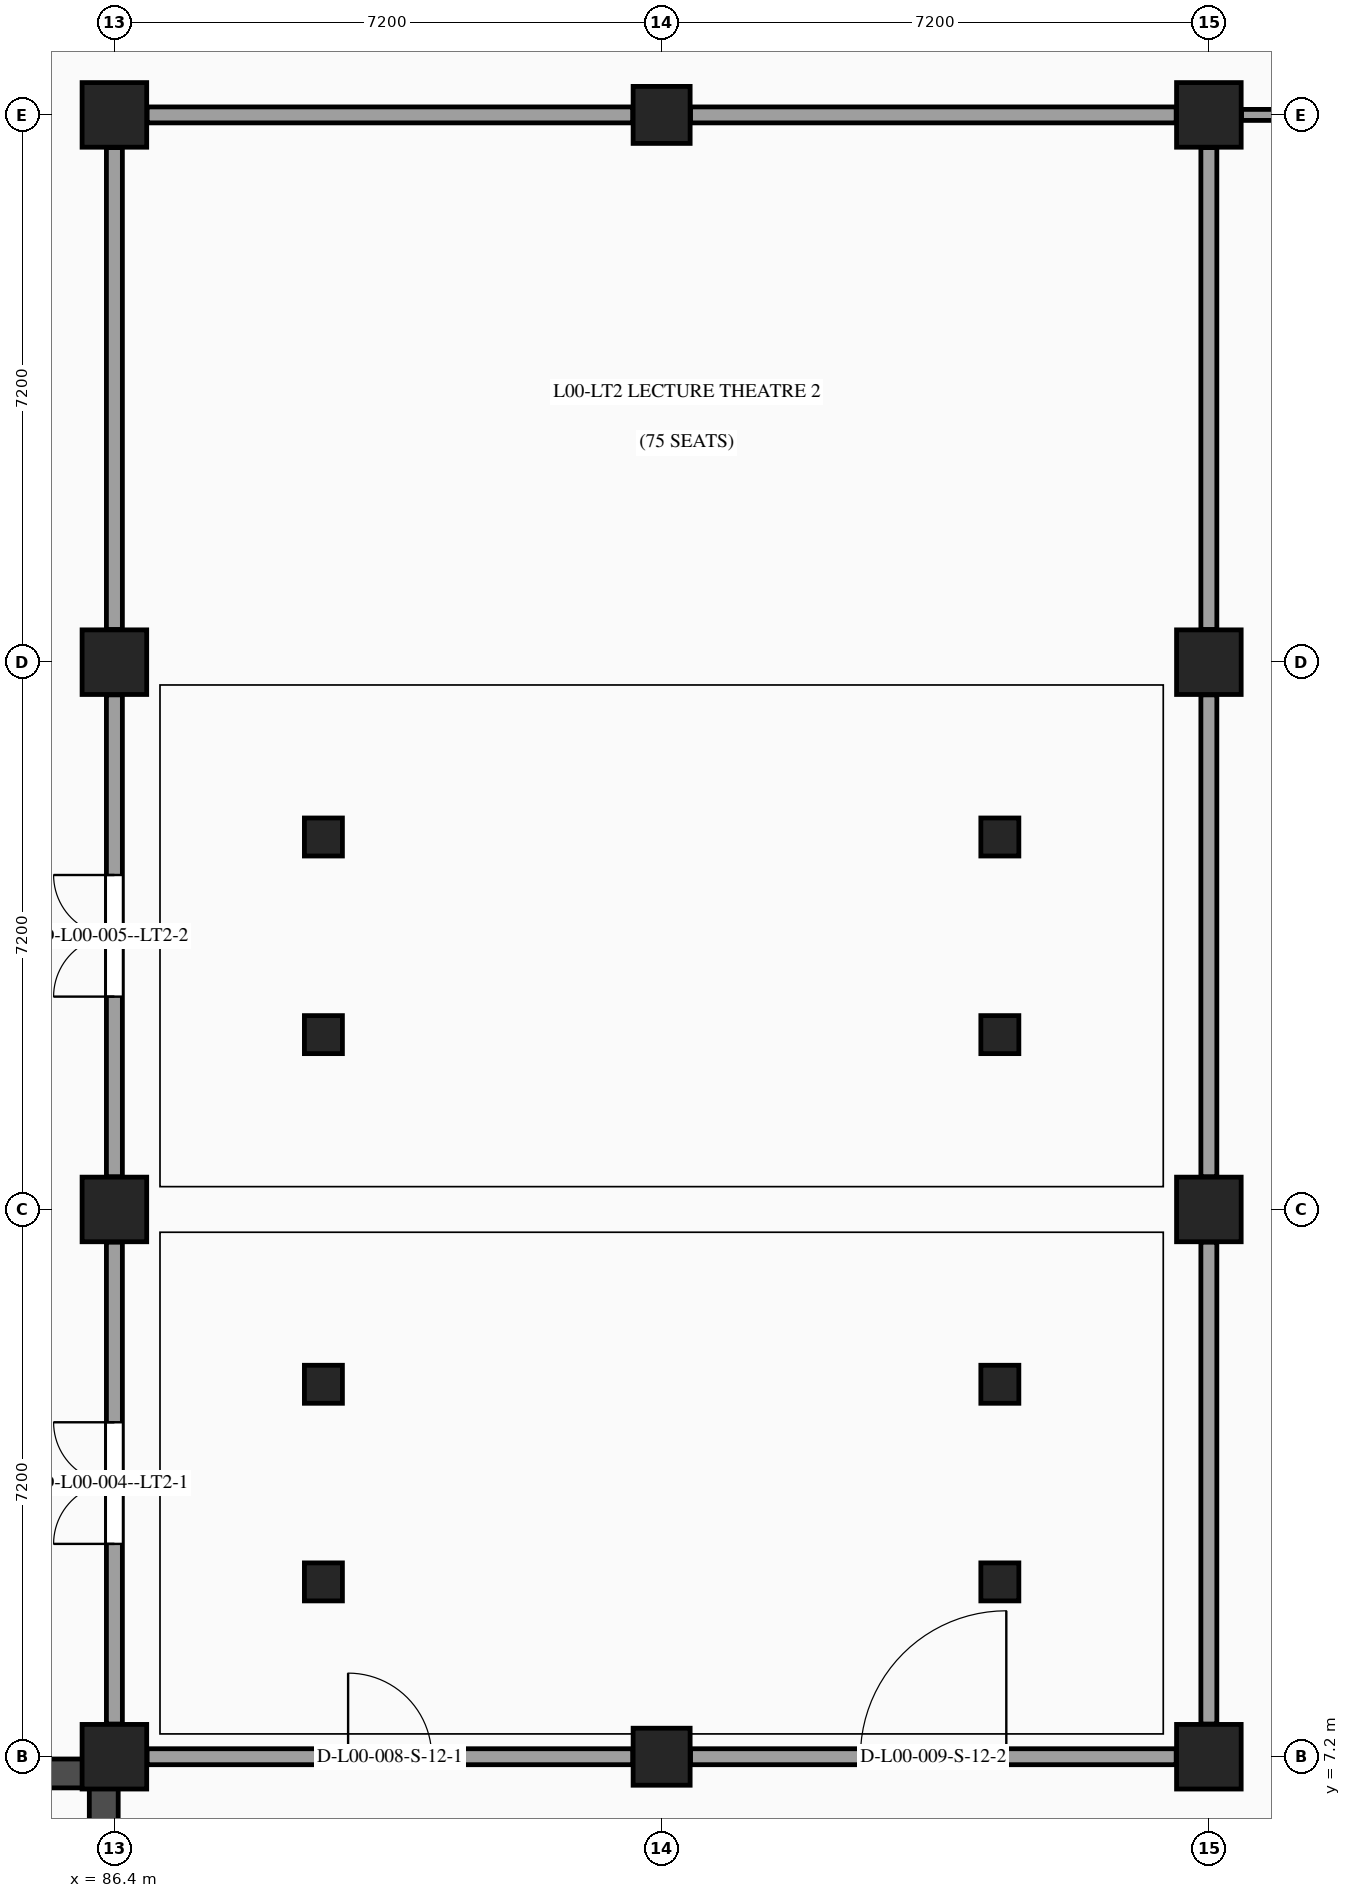
"""IFC4 building model, lengths in metres.
Left out: names, types, materials, properties, quantities, classifications, styles, units other than length and angle.
Written with IfcOpenShell. Run it as: python <this file> out.ifc"""

import sys

from ifc_helpers import new_model, si_unit, direction, frame, frame_2d, origin, origin_2d, place, context, subcontext, project, spatial, rectangle, extrude, element, fill, save


model = new_model("IFC4")
c1 = context("Model", 3, precision=1e-05, world=origin(), true_north=direction((0.0, 1.0)))
c2 = subcontext(c1, "Body", "Model", "MODEL_VIEW")
j1 = project(units=[si_unit("LENGTHUNIT", "METRE"), si_unit("PLANEANGLEUNIT", "RADIAN")], contexts=[c1])
p1 = place(None, origin())
s1 = spatial("IfcSite", under=j1, at=p1, CompositionType="ELEMENT")
p2 = place(p1, origin())
s2 = spatial("IfcBuilding", under=s1, at=p2, CompositionType="ELEMENT")
p3 = place(p2, origin())
s3 = spatial("IfcBuildingStorey", under=s2, at=p3, CompositionType="ELEMENT", Elevation=0.0)
for number, where, z_axis, x_axis in (
    (1, (86.4, 7.2, 0.0), (0.0, 0.0, 1.0), (1.0, 0.0, 0.0)),
    (2, (86.4, 14.4, 0.0), (0.0, 0.0, 1.0), (1.0, 0.0, 0.0)),
    (3, (86.4, 21.6, 0.0), (0.0, 0.0, 1.0), (1.0, 0.0, 0.0)),
    (4, (86.4, 28.8, 0.0), (0.0, 0.0, 1.0), (1.0, 0.0, 0.0)),
):
    element("IfcColumn", number, at=place(p3, frame(where, z_axis=z_axis, x_axis=x_axis)), inside=s3, PredefinedType="COLUMN", context=c2, shape_type="SweptSolid", body=[
        extrude(rectangle(XDim=0.85, YDim=0.85, at=origin_2d()), origin(), (0.0, 0.0, 1.0), 5.4),
    ])
for number, where, z_axis, x_axis in (
    (5, (93.6, 7.2, 0.0), (0.0, 0.0, 1.0), (1.0, 0.0, 0.0)),
    (6, (93.6, 28.8, 0.0), (0.0, 0.0, 1.0), (1.0, 0.0, 0.0)),
):
    element("IfcColumn", number, at=place(p3, frame(where, z_axis=z_axis, x_axis=x_axis)), inside=s3, PredefinedType="COLUMN", context=c2, shape_type="SweptSolid", body=[
        extrude(rectangle(XDim=0.75, YDim=0.75, at=origin_2d()), origin(), (0.0, 0.0, 1.0), 5.4),
    ])
for number, where, z_axis, x_axis in (
    (7, (100.8, 7.2, 0.0), (0.0, 0.0, 1.0), (1.0, 0.0, 0.0)),
    (8, (100.8, 14.4, 0.0), (0.0, 0.0, 1.0), (1.0, 0.0, 0.0)),
    (9, (100.8, 21.6, 0.0), (0.0, 0.0, 1.0), (1.0, 0.0, 0.0)),
    (10, (100.8, 28.8, 0.0), (0.0, 0.0, 1.0), (1.0, 0.0, 0.0)),
):
    element("IfcColumn", number, at=place(p3, frame(where, z_axis=z_axis, x_axis=x_axis)), inside=s3, PredefinedType="COLUMN", context=c2, shape_type="SweptSolid", body=[
        extrude(rectangle(XDim=0.85, YDim=0.85, at=origin_2d()), origin(), (0.0, 0.0, 1.0), 5.4),
    ])
for number, where, z_axis, x_axis in (
    (11, (89.15, 9.5, 0.0), (0.0, 0.0, 1.0), (1.0, 0.0, 0.0)),
    (12, (89.15, 12.1, 0.0), (0.0, 0.0, 1.0), (1.0, 0.0, 0.0)),
    (13, (98.05, 9.5, 0.0), (0.0, 0.0, 1.0), (1.0, 0.0, 0.0)),
    (14, (98.05, 12.1, 0.0), (0.0, 0.0, 1.0), (1.0, 0.0, 0.0)),
):
    element("IfcColumn", number, at=place(p3, frame(where, z_axis=z_axis, x_axis=x_axis)), inside=s3, PredefinedType="COLUMN", context=c2, shape_type="SweptSolid", body=[
        extrude(rectangle(XDim=0.5, YDim=0.5, at=origin_2d()), origin(), (0.0, 0.0, 1.0), 1.27),
    ])
for number, where, z_axis, x_axis in (
    (15, (89.15, 16.7, 0.0), (0.0, 0.0, 1.0), (1.0, 0.0, 0.0)),
    (16, (89.15, 19.3, 0.0), (0.0, 0.0, 1.0), (1.0, 0.0, 0.0)),
    (17, (98.05, 16.7, 0.0), (0.0, 0.0, 1.0), (1.0, 0.0, 0.0)),
    (18, (98.05, 19.3, 0.0), (0.0, 0.0, 1.0), (1.0, 0.0, 0.0)),
):
    element("IfcColumn", number, at=place(p3, frame(where, z_axis=z_axis, x_axis=x_axis)), inside=s3, PredefinedType="COLUMN", context=c2, shape_type="SweptSolid", body=[
        extrude(rectangle(XDim=0.5, YDim=0.5, at=origin_2d()), origin(), (0.0, 0.0, 1.0), 2.77),
    ])
p4 = place(p3, frame((79.61, 6.98, 0.0), z_axis=(0.0, 0.0, 1.0), x_axis=(1.0, 0.0, 0.0)))
e19 = element("IfcWall", 19, at=p4, inside=s3, PredefinedType="SHEAR", context=c2, shape_type="SweptSolid", body=[
    extrude(rectangle(XDim=6.46, YDim=0.38, at=frame_2d((3.23, 0.0))), origin(), (0.0, 0.0, 1.0), 5.09),
])
p5 = place(p4, frame((1.42, 0.0, 0.0)))
e20 = element("IfcOpeningElement", 20, at=p5, cuts=e19, PredefinedType="OPENING", context=c2, shape_type="SweptSolid", body=[
    extrude(rectangle(XDim=0.85, YDim=2.1, at=frame_2d((0.425, 1.05))), frame((0.0, 0.2, 0.0), z_axis=(0.0, -1.0, 0.0), x_axis=(1.0, 0.0, 0.0)), (0.0, 0.0, 1.0), 0.4),
])
p6 = place(p4, frame((3.2, 0.0, 0.0)))
e21 = element("IfcOpeningElement", 21, at=p6, cuts=e19, PredefinedType="OPENING", context=c2, shape_type="SweptSolid", body=[
    extrude(rectangle(XDim=1.6, YDim=2.2, at=frame_2d((0.8, 1.1))), frame((0.0, 0.2, 0.0), z_axis=(0.0, -1.0, 0.0), x_axis=(1.0, 0.0, 0.0)), (0.0, 0.0, 1.0), 0.4),
])
p7 = place(p3, frame((86.26, 0.03, 0.0), z_axis=(0.0, 0.0, 1.0), x_axis=(0.0, 1.0, 0.0)))
e22 = element("IfcWall", 22, at=p7, inside=s3, PredefinedType="SHEAR", context=c2, shape_type="SweptSolid", body=[
    extrude(rectangle(XDim=7.14, YDim=0.38, at=frame_2d((3.57, 0.0))), origin(), (0.0, 0.0, 1.0), 5.09),
])
p8 = place(p3, frame((86.4, 7.63, 0.0), z_axis=(0.0, 0.0, 1.0), x_axis=(0.0, 1.0, 0.0)))
e23 = element("IfcWall", 23, at=p8, inside=s3, PredefinedType="PARTITIONING", context=c2, shape_type="SweptSolid", body=[
    extrude(rectangle(XDim=6.34, YDim=0.21, at=frame_2d((3.17, 0.0))), origin(), (0.0, 0.0, 1.0), 4.405),
])
p9 = place(p8, frame((2.37, 0.0, 0.0)))
e24 = element("IfcOpeningElement", 24, at=p9, cuts=e23, PredefinedType="OPENING", context=c2, shape_type="SweptSolid", body=[
    extrude(rectangle(XDim=1.6, YDim=2.2, at=frame_2d((0.8, 1.1))), frame((0.0, 0.115, 0.0), z_axis=(0.0, -1.0, 0.0), x_axis=(1.0, 0.0, 0.0)), (0.0, 0.0, 1.0), 0.23),
])
p10 = place(p3, frame((86.4, 14.83, 0.0), z_axis=(0.0, 0.0, 1.0), x_axis=(0.0, 1.0, 0.0)))
e25 = element("IfcWall", 25, at=p10, inside=s3, PredefinedType="PARTITIONING", context=c2, shape_type="SweptSolid", body=[
    extrude(rectangle(XDim=6.34, YDim=0.21, at=frame_2d((3.17, 0.0))), origin(), (0.0, 0.0, 1.0), 4.405),
])
p11 = place(p10, frame((2.37, 0.0, 0.0)))
e26 = element("IfcOpeningElement", 26, at=p11, cuts=e25, PredefinedType="OPENING", context=c2, shape_type="SweptSolid", body=[
    extrude(rectangle(XDim=1.6, YDim=2.2, at=frame_2d((0.8, 1.1))), frame((0.0, 0.115, 0.0), z_axis=(0.0, -1.0, 0.0), x_axis=(1.0, 0.0, 0.0)), (0.0, 0.0, 1.0), 0.23),
])
p12 = place(p3, frame((86.4, 22.03, 0.0), z_axis=(0.0, 0.0, 1.0), x_axis=(0.0, 1.0, 0.0)))
e27 = element("IfcWall", 27, at=p12, inside=s3, PredefinedType="PARTITIONING", context=c2, shape_type="SweptSolid", body=[
    extrude(rectangle(XDim=6.34, YDim=0.21, at=frame_2d((3.17, 0.0))), origin(), (0.0, 0.0, 1.0), 4.4),
])
p13 = place(p3, frame((86.83, 7.2, 0.0), z_axis=(0.0, 0.0, 1.0), x_axis=(1.0, 0.0, 0.0)))
e28 = element("IfcWall", 28, at=p13, inside=s3, PredefinedType="PARTITIONING", context=c2, shape_type="SweptSolid", body=[
    extrude(rectangle(XDim=6.39, YDim=0.21, at=frame_2d((3.195, 0.0))), origin(), (0.0, 0.0, 1.0), 4.35),
])
p14 = place(p13, frame((2.645, 0.0, 0.0)))
e29 = element("IfcOpeningElement", 29, at=p14, cuts=e28, PredefinedType="OPENING", context=c2, shape_type="SweptSolid", body=[
    extrude(rectangle(XDim=1.1, YDim=2.15, at=frame_2d((0.55, 1.075))), frame((0.0, 0.115, 0.0), z_axis=(0.0, -1.0, 0.0), x_axis=(1.0, 0.0, 0.0)), (0.0, 0.0, 1.0), 0.23),
])
p15 = place(p3, frame((86.83, 28.8, 0.0), z_axis=(0.0, 0.0, 1.0), x_axis=(1.0, 0.0, 0.0)))
e30 = element("IfcWall", 30, at=p15, inside=s3, PredefinedType="PARTITIONING", context=c2, shape_type="SweptSolid", body=[
    extrude(rectangle(XDim=6.39, YDim=0.21, at=frame_2d((3.195, 0.0))), origin(), (0.0, 0.0, 1.0), 4.35),
])
p16 = place(p3, frame((93.98, 7.2, 0.0), z_axis=(0.0, 0.0, 1.0), x_axis=(1.0, 0.0, 0.0)))
e31 = element("IfcWall", 31, at=p16, inside=s3, PredefinedType="PARTITIONING", context=c2, shape_type="SweptSolid", body=[
    extrude(rectangle(XDim=6.39, YDim=0.21, at=frame_2d((3.195, 0.0))), origin(), (0.0, 0.0, 1.0), 4.365),
])
p17 = place(p16, frame((2.235, 0.0, 0.0)))
e32 = element("IfcOpeningElement", 32, at=p17, cuts=e31, PredefinedType="OPENING", context=c2, shape_type="SweptSolid", body=[
    extrude(rectangle(XDim=1.92, YDim=2.35, at=frame_2d((0.96, 1.175))), frame((0.0, 0.115, 0.0), z_axis=(0.0, -1.0, 0.0), x_axis=(1.0, 0.0, 0.0)), (0.0, 0.0, 1.0), 0.23),
])
p18 = place(p3, frame((100.8, 7.63, 0.0), z_axis=(0.0, 0.0, 1.0), x_axis=(0.0, 1.0, 0.0)))
e33 = element("IfcWall", 33, at=p18, inside=s3, PredefinedType="PARTITIONING", context=c2, shape_type="SweptSolid", body=[
    extrude(rectangle(XDim=6.34, YDim=0.21, at=frame_2d((3.17, 0.0))), origin(), (0.0, 0.0, 1.0), 4.405),
])
p19 = place(p3, frame((100.8, 14.83, 0.0), z_axis=(0.0, 0.0, 1.0), x_axis=(0.0, 1.0, 0.0)))
e34 = element("IfcWall", 34, at=p19, inside=s3, PredefinedType="PARTITIONING", context=c2, shape_type="SweptSolid", body=[
    extrude(rectangle(XDim=6.34, YDim=0.21, at=frame_2d((3.17, 0.0))), origin(), (0.0, 0.0, 1.0), 4.405),
])
p20 = place(p3, frame((100.8, 22.03, 0.0), z_axis=(0.0, 0.0, 1.0), x_axis=(0.0, 1.0, 0.0)))
e35 = element("IfcWall", 35, at=p20, inside=s3, PredefinedType="PARTITIONING", context=c2, shape_type="SweptSolid", body=[
    extrude(rectangle(XDim=6.34, YDim=0.21, at=frame_2d((3.17, 0.0))), origin(), (0.0, 0.0, 1.0), 4.4),
])
p21 = place(p3, frame((93.98, 28.8, 0.0), z_axis=(0.0, 0.0, 1.0), x_axis=(1.0, 0.0, 0.0)))
e36 = element("IfcWall", 36, at=p21, inside=s3, PredefinedType="PARTITIONING", context=c2, shape_type="SweptSolid", body=[
    extrude(rectangle(XDim=6.39, YDim=0.21, at=frame_2d((3.195, 0.0))), origin(), (0.0, 0.0, 1.0), 4.365),
])
p22 = place(p3, frame((101.23, 28.8, 0.0), z_axis=(0.0, 0.0, 1.0), x_axis=(1.0, 0.0, 0.0)))
e37 = element("IfcWall", 37, at=p22, inside=s3, PredefinedType="PARTITIONING", context=c2, shape_type="SweptSolid", body=[
    extrude(rectangle(XDim=6.29, YDim=0.145, at=frame_2d((3.145, 0.0))), origin(), (0.0, 0.0, 1.0), 4.37),
])
p23 = place(p9, origin())
e38 = element("IfcDoor", 38, at=p23, inside=s3, OperationType="DOUBLE_DOOR_SINGLE_SWING", PredefinedType="DOOR", context=c2, shape_type="SweptSolid", body=[
    extrude(rectangle(XDim=1.6, YDim=2.2, at=frame_2d((0.8, 1.1))), frame((0.0, 0.025, 0.0), z_axis=(0.0, -1.0, 0.0), x_axis=(1.0, 0.0, 0.0)), (0.0, 0.0, 1.0), 0.05),
])
fill(e24, e38)
p24 = place(p11, origin())
e39 = element("IfcDoor", 39, at=p24, inside=s3, OperationType="DOUBLE_DOOR_SINGLE_SWING", PredefinedType="DOOR", context=c2, shape_type="SweptSolid", body=[
    extrude(rectangle(XDim=1.6, YDim=2.2, at=frame_2d((0.8, 1.1))), frame((0.0, 0.025, 0.0), z_axis=(0.0, -1.0, 0.0), x_axis=(1.0, 0.0, 0.0)), (0.0, 0.0, 1.0), 0.05),
])
fill(e26, e39)
p25 = place(p14, origin())
e40 = element("IfcDoor", 40, at=p25, inside=s3, OperationType="SINGLE_SWING_LEFT", PredefinedType="DOOR", context=c2, shape_type="SweptSolid", body=[
    extrude(rectangle(XDim=1.1, YDim=2.15, at=frame_2d((0.55, 1.075))), frame((0.0, 0.025, 0.0), z_axis=(0.0, -1.0, 0.0), x_axis=(1.0, 0.0, 0.0)), (0.0, 0.0, 1.0), 0.05),
])
fill(e29, e40)
p26 = place(p17, origin())
e41 = element("IfcDoor", 41, at=p26, inside=s3, OperationType="SINGLE_SWING_RIGHT", PredefinedType="DOOR", context=c2, shape_type="SweptSolid", body=[
    extrude(rectangle(XDim=1.92, YDim=2.35, at=frame_2d((0.96, 1.175))), frame((0.0, 0.025, 0.0), z_axis=(0.0, -1.0, 0.0), x_axis=(1.0, 0.0, 0.0)), (0.0, 0.0, 1.0), 0.05),
])
fill(e32, e41)
save(model, sys.argv[1])
